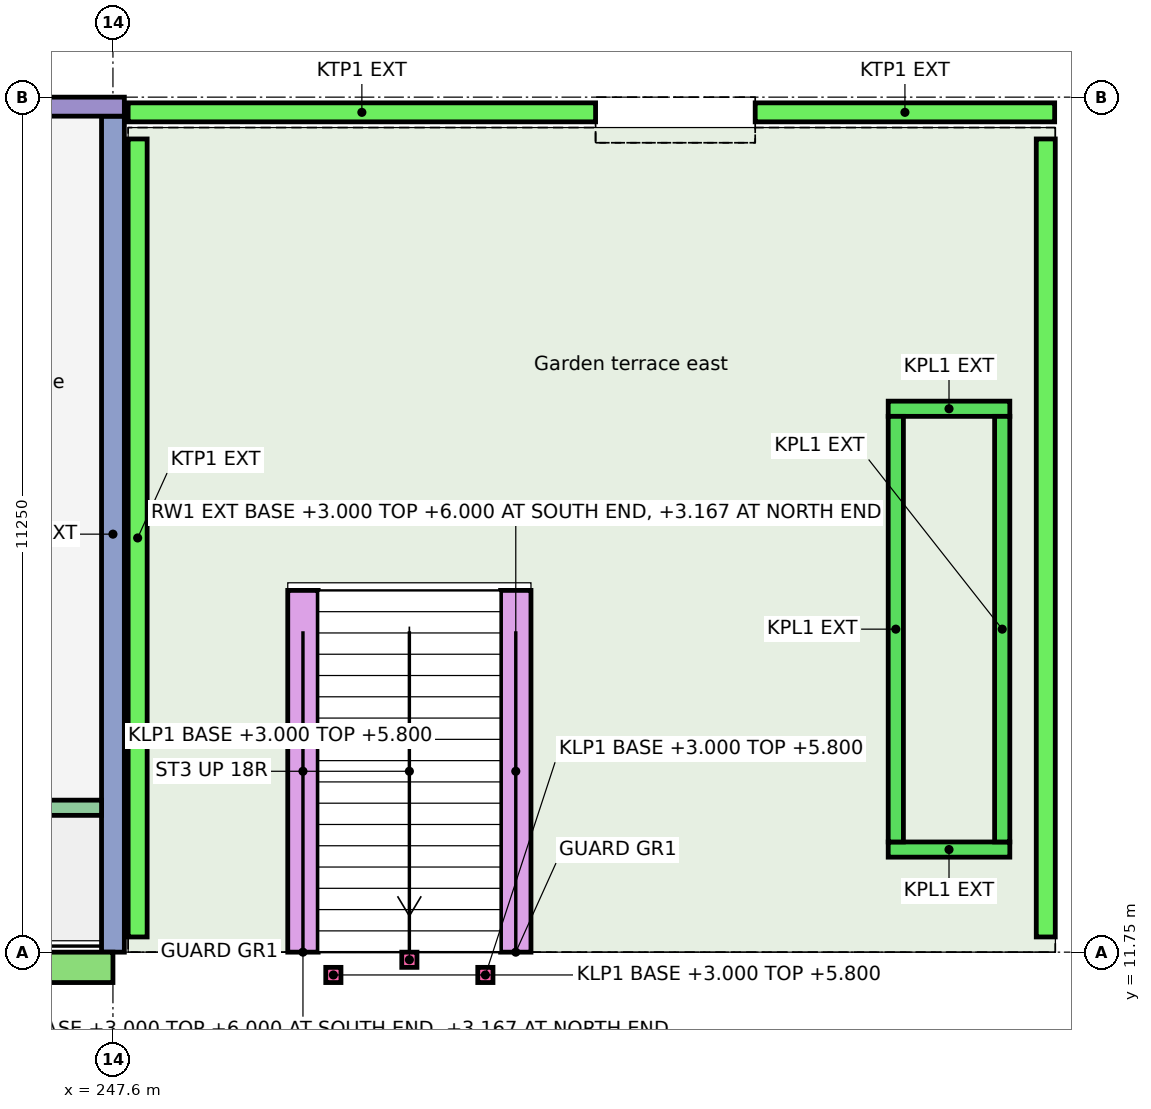
"""IFC4 building model, lengths in metres.
Left out: names, types, materials, properties, quantities, classifications, styles, units other than length and angle.
Written with IfcOpenShell. Run it as: python <this file> out.ifc"""

import sys

from ifc_helpers import new_model, si_unit, direction, frame, frame_2d, origin, origin_2d, place, context, subcontext, project, spatial, polyline, rectangle, outline, extrude, element, save


model = new_model("IFC4")
c1 = context("Model", 3, precision=1e-05, world=origin(), true_north=direction((0.0, 1.0)))
c2 = subcontext(c1, "Body", "Model", "MODEL_VIEW")
j1 = project(units=[si_unit("LENGTHUNIT", "METRE"), si_unit("PLANEANGLEUNIT", "RADIAN")], contexts=[c1])
p1 = place(None, origin())
s1 = spatial("IfcSite", under=j1, at=p1, CompositionType="ELEMENT")
p2 = place(p1, origin())
s2 = spatial("IfcBuilding", under=s1, at=p2, CompositionType="ELEMENT")
p3 = place(p2, frame((0.0, 0.0, 3.0)))
s3 = spatial("IfcBuildingStorey", under=s2, at=p3, CompositionType="ELEMENT", Elevation=3.0)
p4 = place(p3, frame((247.6, 11.75, 0.0), z_axis=(0.0, 0.0, 1.0), x_axis=(0.0, 1.0, 0.0)))
e1 = element("IfcWall", 1, at=p4, inside=s3, PredefinedType="SHEAR", context=c2, shape_type="SweptSolid", body=[
    extrude(rectangle(XDim=11.0, YDim=0.3, at=frame_2d((5.5, 0.0))), origin(), (0.0, 0.0, 1.0), 3.0),
])
p5 = place(p3, frame((244.0, 22.875, 0.0), z_axis=(0.0, 0.0, 1.0), x_axis=(1.0, 0.0, 0.0)))
e2 = element("IfcWall", 2, at=p5, inside=s3, PredefinedType="SOLIDWALL", context=c2, shape_type="SweptSolid", body=[
    extrude(rectangle(XDim=3.75, YDim=0.25, at=frame_2d((1.875, 0.0))), origin(), (0.0, 0.0, 1.0), 3.0),
])
p6 = place(p3, frame((244.0, 13.65, 0.0), z_axis=(0.0, 0.0, 1.0), x_axis=(1.0, 0.0, 0.0)))
e3 = element("IfcWall", 3, at=p6, inside=s3, PredefinedType="SOLIDWALL", context=c2, shape_type="SweptSolid", body=[
    extrude(rectangle(XDim=3.45, YDim=0.2, at=frame_2d((1.725, 0.0))), origin(), (0.0, 0.0, 1.0), 3.0),
])
p7 = place(p6, frame((1.288, 0.0, 0.0)))
e4 = element("IfcOpeningElement", 4, at=p7, cuts=e3, PredefinedType="OPENING", context=c2, shape_type="SweptSolid", body=[
    extrude(rectangle(XDim=1.0, YDim=2.1, at=frame_2d((0.5, 1.05))), frame((0.0, 0.11, 0.0), z_axis=(0.0, -1.0, 0.0), x_axis=(1.0, 0.0, 0.0)), (0.0, 0.0, 1.0), 0.22),
])
p8 = place(p3, frame((230.8, 11.55, 0.0), z_axis=(0.0, 0.0, 1.0), x_axis=(1.0, 0.0, 0.0)))
e5 = element("IfcWall", 5, at=p8, inside=s3, PredefinedType="SOLIDWALL", context=c2, shape_type="SweptSolid", body=[
    extrude(rectangle(XDim=16.8, YDim=0.4, at=frame_2d((8.4, 0.0))), origin(), (0.0, 0.0, 1.0), 2.85),
])
p9 = place(p3, frame((247.8, 22.8, 0.0), z_axis=(0.0, 0.0, 1.0), x_axis=(1.0, 0.0, 0.0)))
e6 = element("IfcWall", 6, at=p9, inside=s3, PredefinedType="PARAPET", context=c2, shape_type="SweptSolid", body=[
    extrude(rectangle(XDim=6.15, YDim=0.25, at=frame_2d((3.075, 0.0))), origin(), (0.0, 0.0, 1.0), 1.1),
])
p10 = place(p3, frame((256.05, 22.8, 0.0), z_axis=(0.0, 0.0, 1.0), x_axis=(1.0, 0.0, 0.0)))
e7 = element("IfcWall", 7, at=p10, inside=s3, PredefinedType="PARAPET", context=c2, shape_type="SweptSolid", body=[
    extrude(rectangle(XDim=3.94, YDim=0.25, at=frame_2d((1.97, 0.0))), origin(), (0.0, 0.0, 1.0), 1.1),
])
p11 = place(p2, origin())
s4 = spatial("IfcBuildingStorey", under=s2, at=p11, CompositionType="ELEMENT", Elevation=0.0)
p12 = place(p11, frame((247.6, 11.55, -0.25), z_axis=(0.0, 0.0, 1.0), x_axis=(1.0, 0.0, 0.0)))
e8 = element("IfcWall", 8, at=p12, inside=s4, PredefinedType="SOLIDWALL", context=c2, shape_type="SweptSolid", body=[
    extrude(rectangle(XDim=2.7, YDim=0.4, at=frame_2d((1.35, 0.0))), origin(), (0.0, 0.0, 1.0), 6.25),
])
p13 = place(p11, frame((252.7, 11.55, -0.25), z_axis=(0.0, 0.0, 1.0), x_axis=(1.0, 0.0, 0.0)))
e9 = element("IfcWall", 9, at=p13, inside=s4, PredefinedType="SOLIDWALL", context=c2, shape_type="SweptSolid", body=[
    extrude(rectangle(XDim=7.29, YDim=0.4, at=frame_2d((3.645, 0.0))), origin(), (0.0, 0.0, 1.0), 6.25),
])
for number, where, z_axis, x_axis in (
    (10, (250.5, 11.45, 0.0), (0.0, 0.0, 1.0), (1.0, 0.0, 0.0)),
    (11, (252.5, 11.45, 0.0), (0.0, 0.0, 1.0), (1.0, 0.0, 0.0)),
    (12, (251.5, 11.65, 0.0), (0.0, 0.0, 1.0), (1.0, 0.0, 0.0)),
):
    element("IfcColumn", number, at=place(p3, frame(where, z_axis=z_axis, x_axis=x_axis)), inside=s3, PredefinedType="COLUMN", context=c2, shape_type="SweptSolid", body=[
        extrude(rectangle(XDim=0.2, YDim=0.2, at=origin_2d()), origin(), (0.0, 0.0, 1.0), 2.8),
    ])
for number, where, z_axis, x_axis in (
    (13, (247.925, 11.95, 0.0), (0.0, 0.0, 1.0), (0.0, 1.0, 0.0)),
    (14, (259.873, 11.95, 0.0), (0.0, 0.0, 1.0), (0.0, 1.0, 0.0)),
):
    element("IfcWall", number, at=place(p3, frame(where, z_axis=z_axis, x_axis=x_axis)), inside=s3, PredefinedType="PARAPET", context=c2, shape_type="SweptSolid", body=[
        extrude(rectangle(XDim=10.5, YDim=0.25, at=frame_2d((5.25, 0.0))), origin(), (0.0, 0.0, 1.0), 1.1),
    ])
for number, where, z_axis, x_axis in (
    (15, (257.8, 13.1, 0.0), (0.0, 0.0, 1.0), (1.0, 0.0, 0.0)),
    (16, (257.8, 18.9, 0.0), (0.0, 0.0, 1.0), (1.0, 0.0, 0.0)),
):
    element("IfcWall", number, at=place(p3, frame(where, z_axis=z_axis, x_axis=x_axis)), inside=s3, PredefinedType="SOLIDWALL", context=c2, shape_type="SweptSolid", body=[
        extrude(rectangle(XDim=1.6, YDim=0.2, at=frame_2d((0.8, 0.0))), origin(), (0.0, 0.0, 1.0), 0.6),
    ])
for number, where, z_axis, x_axis in (
    (17, (257.9, 13.2, 0.0), (0.0, 0.0, 1.0), (0.0, 1.0, 0.0)),
    (18, (259.3, 13.2, 0.0), (0.0, 0.0, 1.0), (0.0, 1.0, 0.0)),
):
    element("IfcWall", number, at=place(p3, frame(where, z_axis=z_axis, x_axis=x_axis)), inside=s3, PredefinedType="SOLIDWALL", context=c2, shape_type="SweptSolid", body=[
        extrude(rectangle(XDim=5.6, YDim=0.2, at=frame_2d((2.8, 0.0))), origin(), (0.0, 0.0, 1.0), 0.6),
    ])
p14 = place(p11, frame((259.798, 0.402, -0.25), z_axis=(0.0, 0.0, 1.0), x_axis=(0.0, 1.0, 0.0)))
e19 = element("IfcWall", 19, at=p14, inside=s4, PredefinedType="SOLIDWALL", context=c2, shape_type="SweptSolid", body=[
    extrude(rectangle(XDim=10.948, YDim=0.4, at=frame_2d((5.474, 0.0))), origin(), (0.0, 0.0, 1.0), 6.0),
])
for number, where, z_axis, x_axis in (
    (20, (250.1, 11.75, 0.0), (0.0, 0.0, 1.0), (0.0, 1.0, 0.0)),
    (21, (252.9, 11.75, 0.0), (0.0, 0.0, 1.0), (0.0, 1.0, 0.0)),
):
    element("IfcWall", number, at=place(p3, frame(where, z_axis=z_axis, x_axis=x_axis)), inside=s3, PredefinedType="SOLIDWALL", context=c2, shape_type="SweptSolid", body=[
        extrude(outline(polyline([(0.0, 0.0), (4.76, 0.0), (4.76, 0.167), (0.0, 3.0), (0.0, 0.0)])), frame((0.0, 0.2, 0.0), z_axis=(0.0, -1.0, 0.0), x_axis=(1.0, 0.0, 0.0)), (0.0, 0.0, 1.0), 0.4),
    ])
save(model, sys.argv[1])
